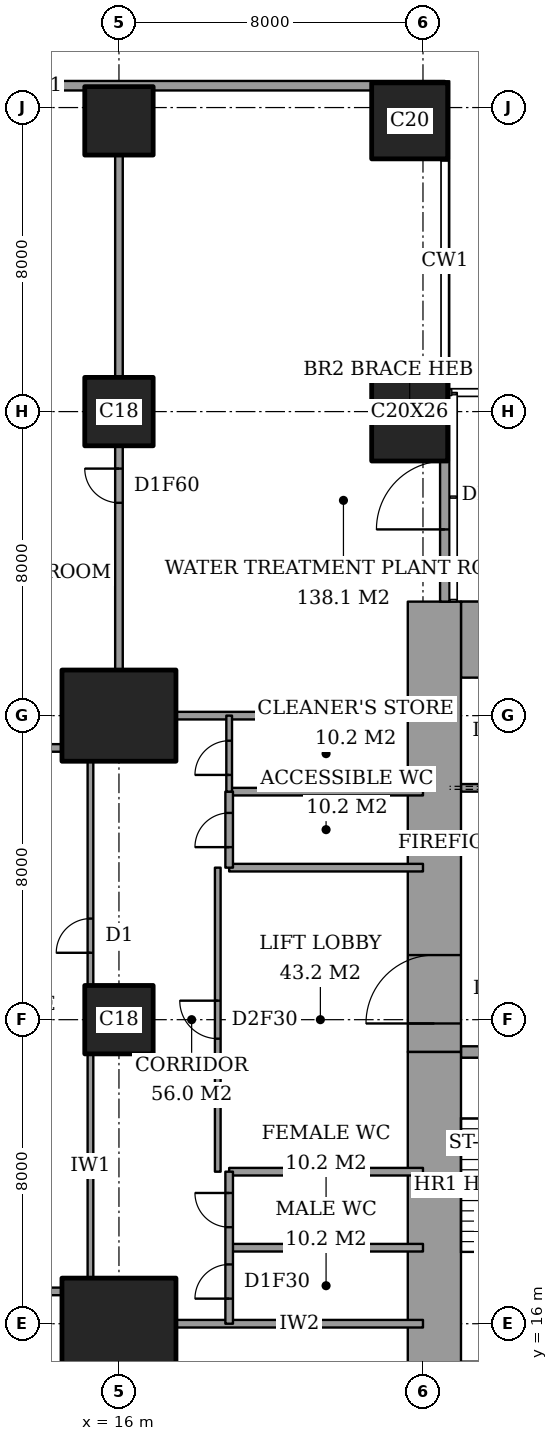
"""IFC4 building model, lengths in metres.
Left out: names, types, materials, properties, quantities, classifications, styles, units other than length and angle.
Written with IfcOpenShell. Run it as: python <this file> out.ifc"""

import sys

from ifc_helpers import new_model, si_unit, direction, frame, frame_2d, origin, origin_2d, place, context, subcontext, project, spatial, rectangle, extrude, element, fill, save


model = new_model("IFC4")
c1 = context("Model", 3, precision=1e-05, world=origin(), true_north=direction((0.0, 1.0)))
c2 = subcontext(c1, "Body", "Model", "MODEL_VIEW")
j1 = project(units=[si_unit("LENGTHUNIT", "METRE"), si_unit("PLANEANGLEUNIT", "RADIAN")], contexts=[c1])
p1 = place(None, origin())
s1 = spatial("IfcSite", under=j1, at=p1, CompositionType="ELEMENT")
p2 = place(p1, origin())
s2 = spatial("IfcBuilding", under=s1, at=p2, CompositionType="ELEMENT")
p3 = place(p2, frame((0.0, 0.0, 177.2)))
s3 = spatial("IfcBuildingStorey", under=s2, at=p3, CompositionType="ELEMENT", Elevation=177.2)
p4 = place(p3, frame((16.0, 16.0, 0.0), z_axis=(0.0, 0.0, 1.0), x_axis=(1.0, 0.0, 0.0)))
e1 = element("IfcColumn", 1, at=p4, inside=s3, PredefinedType="COLUMN", context=c2, shape_type="SweptSolid", body=[
    extrude(rectangle(XDim=3.0, YDim=2.4, at=origin_2d()), origin(), (0.0, 0.0, 1.0), 5.0),
])
p5 = place(p3, frame((16.0, 24.0, 0.0), z_axis=(0.0, 0.0, 1.0), x_axis=(1.0, 0.0, 0.0)))
e2 = element("IfcColumn", 2, at=p5, inside=s3, PredefinedType="COLUMN", context=c2, shape_type="SweptSolid", body=[
    extrude(rectangle(XDim=1.8, YDim=1.8, at=origin_2d()), origin(), (0.0, 0.0, 1.0), 5.0),
])
p6 = place(p3, frame((16.0, 32.0, 0.0), z_axis=(0.0, 0.0, 1.0), x_axis=(1.0, 0.0, 0.0)))
e3 = element("IfcColumn", 3, at=p6, inside=s3, PredefinedType="COLUMN", context=c2, shape_type="SweptSolid", body=[
    extrude(rectangle(XDim=3.0, YDim=2.4, at=origin_2d()), origin(), (0.0, 0.0, 1.0), 5.0),
])
for number, where, z_axis, x_axis in (
    (4, (16.0, 40.0, 0.0), (0.0, 0.0, 1.0), (1.0, 0.0, 0.0)),
    (5, (16.0, 47.65, 0.0), (0.0, 0.0, 1.0), (1.0, 0.0, 0.0)),
):
    element("IfcColumn", number, at=place(p3, frame(where, z_axis=z_axis, x_axis=x_axis)), inside=s3, PredefinedType="COLUMN", context=c2, shape_type="SweptSolid", body=[
        extrude(rectangle(XDim=1.8, YDim=1.8, at=origin_2d()), origin(), (0.0, 0.0, 1.0), 5.0),
    ])
p7 = place(p3, frame((23.65, 40.0, 0.0), z_axis=(0.0, 0.0, 1.0), x_axis=(1.0, 0.0, 0.0)))
e6 = element("IfcColumn", 6, at=p7, inside=s3, PredefinedType="COLUMN", context=c2, shape_type="SweptSolid", body=[
    extrude(rectangle(XDim=2.0, YDim=2.6, at=origin_2d()), origin(), (0.0, 0.0, 1.0), 5.0),
])
p8 = place(p3, frame((23.65, 47.65, 0.0), z_axis=(0.0, 0.0, 1.0), x_axis=(1.0, 0.0, 0.0)))
e7 = element("IfcColumn", 7, at=p8, inside=s3, PredefinedType="COLUMN", context=c2, shape_type="SweptSolid", body=[
    extrude(rectangle(XDim=2.0, YDim=2.0, at=origin_2d()), origin(), (0.0, 0.0, 1.0), 5.0),
])
p9 = place(p3, frame((25.0, 34.0, 0.0), z_axis=(0.0, 0.0, 1.0), x_axis=(1.0, 0.0, 0.0)))
e8 = element("IfcWall", 8, at=p9, inside=s3, PredefinedType="SHEAR", context=c2, shape_type="SweptSolid", body=[
    extrude(rectangle(XDim=3.15, YDim=2.0, at=frame_2d((1.575, 0.0))), origin(), (0.0, 0.0, 1.0), 5.0),
])
p10 = place(p3, frame((24.3, 13.0, 0.0), z_axis=(0.0, 0.0, 1.0), x_axis=(0.0, 1.0, 0.0)))
e9 = element("IfcWall", 9, at=p10, inside=s3, PredefinedType="SHEAR", context=c2, shape_type="SweptSolid", body=[
    extrude(rectangle(XDim=10.15, YDim=1.4, at=frame_2d((5.075, 0.0))), origin(), (0.0, 0.0, 1.0), 5.0),
])
p11 = place(p3, frame((24.3, 23.15, 0.0), z_axis=(0.0, 0.0, 1.0), x_axis=(0.0, 1.0, 0.0)))
e10 = element("IfcWall", 10, at=p11, inside=s3, PredefinedType="SHEAR", context=c2, shape_type="SweptSolid", body=[
    extrude(rectangle(XDim=11.85, YDim=1.4, at=frame_2d((5.925, 0.0))), origin(), (0.0, 0.0, 1.0), 5.0),
])
p12 = place(p11, frame((0.75, 0.0, 0.0)))
e11 = element("IfcOpeningElement", 11, at=p12, cuts=e10, PredefinedType="OPENING", context=c2, shape_type="SweptSolid", body=[
    extrude(rectangle(XDim=1.8, YDim=2.4, at=frame_2d((0.9, 1.2))), frame((0.0, 0.71, 0.0), z_axis=(0.0, -1.0, 0.0), x_axis=(1.0, 0.0, 0.0)), (0.0, 0.0, 1.0), 1.42),
])
p13 = place(p3, frame((25.0, 23.15, 0.0), z_axis=(0.0, 0.0, 1.0), x_axis=(1.0, 0.0, 0.0)))
e12 = element("IfcWall", 12, at=p13, inside=s3, PredefinedType="SHEAR", context=c2, shape_type="SweptSolid", body=[
    extrude(rectangle(XDim=3.15, YDim=0.3, at=frame_2d((1.575, 0.0))), origin(), (0.0, 0.0, 1.0), 5.0),
])
p14 = place(p13, frame((0.6, 0.0, 0.0)))
e13 = element("IfcOpeningElement", 13, at=p14, cuts=e12, PredefinedType="OPENING", context=c2, shape_type="SweptSolid", body=[
    extrude(rectangle(XDim=1.0, YDim=2.1, at=frame_2d((0.5, 1.05))), frame((0.0, 0.16, 0.0), z_axis=(0.0, -1.0, 0.0), x_axis=(1.0, 0.0, 0.0)), (0.0, 0.0, 1.0), 0.32),
])
p15 = place(p3, frame((24.575, 35.0, 0.0), z_axis=(0.0, 0.0, 1.0), x_axis=(0.0, 1.0, 0.0)))
e14 = element("IfcWall", 14, at=p15, inside=s3, PredefinedType="SOLIDWALL", context=c2, shape_type="SweptSolid", body=[
    extrude(rectangle(XDim=5.6, YDim=0.25, at=frame_2d((2.8, 0.0))), origin(), (0.0, 0.0, 1.0), 5.0),
])
p16 = place(p15, frame((1.9, 0.0, 0.0)))
e15 = element("IfcOpeningElement", 15, at=p16, cuts=e14, PredefinedType="OPENING", context=c2, shape_type="SweptSolid", body=[
    extrude(rectangle(XDim=1.8, YDim=2.4, at=frame_2d((0.9, 1.2))), frame((0.0, 0.135, 0.0), z_axis=(0.0, -1.0, 0.0), x_axis=(1.0, 0.0, 0.0)), (0.0, 0.0, 1.0), 0.27),
])
p17 = place(p3, frame((24.575, 48.575, 0.0), z_axis=(0.0, 0.0, 1.0), x_axis=(-1.0, 0.0, 0.0)))
e16 = element("IfcWall", 16, at=p17, inside=s3, PredefinedType="SOLIDWALL", context=c2, shape_type="SweptSolid", body=[
    extrude(rectangle(XDim=21.4, YDim=0.25, at=frame_2d((10.7, 0.0))), origin(), (0.0, 0.0, 1.0), 5.0),
])
p18 = place(p17, frame((18.175, 0.0, 0.6)))
e17 = element("IfcOpeningElement", 17, at=p18, cuts=e16, PredefinedType="OPENING", context=c2, shape_type="SweptSolid", body=[
    extrude(rectangle(XDim=2.4, YDim=3.0, at=frame_2d((1.2, 1.5))), frame((0.0, 0.135, 0.0), z_axis=(0.0, -1.0, 0.0), x_axis=(1.0, 0.0, 0.0)), (0.0, 0.0, 1.0), 0.27),
])
p19 = place(p3, frame((17.5, 16.0, 0.0), z_axis=(0.0, 0.0, 1.0), x_axis=(1.0, 0.0, 0.0)))
e18 = element("IfcWall", 18, at=p19, inside=s3, PredefinedType="PARTITIONING", context=c2, shape_type="SweptSolid", body=[
    extrude(rectangle(XDim=6.5, YDim=0.2, at=frame_2d((3.25, 0.0))), origin(), (0.0, 0.0, 1.0), 4.75),
])
p20 = place(p3, frame((9.5, 16.85, 0.0), z_axis=(0.0, 0.0, 1.0), x_axis=(1.0, 0.0, 0.0)))
e19 = element("IfcWall", 19, at=p20, inside=s3, PredefinedType="PARTITIONING", context=c2, shape_type="SweptSolid", body=[
    extrude(rectangle(XDim=5.0, YDim=0.2, at=frame_2d((2.5, 0.0))), origin(), (0.0, 0.0, 1.0), 4.75),
])
for number, where, z_axis, x_axis in (
    (20, (18.9, 18.0, 0.0), (0.0, 0.0, 1.0), (1.0, 0.0, 0.0)),
    (21, (18.9, 20.0, 0.0), (0.0, 0.0, 1.0), (1.0, 0.0, 0.0)),
    (22, (18.9, 28.0, 0.0), (0.0, 0.0, 1.0), (1.0, 0.0, 0.0)),
    (23, (18.9, 30.0, 0.0), (0.0, 0.0, 1.0), (1.0, 0.0, 0.0)),
):
    element("IfcWall", number, at=place(p3, frame(where, z_axis=z_axis, x_axis=x_axis)), inside=s3, PredefinedType="PARTITIONING", context=c2, shape_type="SweptSolid", body=[
        extrude(rectangle(XDim=5.1, YDim=0.2, at=frame_2d((2.55, 0.0))), origin(), (0.0, 0.0, 1.0), 4.75),
    ])
p21 = place(p3, frame((9.5, 31.15, 0.0), z_axis=(0.0, 0.0, 1.0), x_axis=(1.0, 0.0, 0.0)))
e24 = element("IfcWall", 24, at=p21, inside=s3, PredefinedType="PARTITIONING", context=c2, shape_type="SweptSolid", body=[
    extrude(rectangle(XDim=5.0, YDim=0.2, at=frame_2d((2.5, 0.0))), origin(), (0.0, 0.0, 1.0), 4.75),
])
p22 = place(p3, frame((17.5, 32.0, 0.0), z_axis=(0.0, 0.0, 1.0), x_axis=(1.0, 0.0, 0.0)))
e25 = element("IfcWall", 25, at=p22, inside=s3, PredefinedType="PARTITIONING", context=c2, shape_type="SweptSolid", body=[
    extrude(rectangle(XDim=6.5, YDim=0.2, at=frame_2d((3.25, 0.0))), origin(), (0.0, 0.0, 1.0), 4.75),
])
p23 = place(p3, frame((15.25, 17.2, 0.0), z_axis=(0.0, 0.0, 1.0), x_axis=(0.0, 1.0, 0.0)))
e26 = element("IfcWall", 26, at=p23, inside=s3, PredefinedType="PARTITIONING", context=c2, shape_type="SweptSolid", body=[
    extrude(rectangle(XDim=5.9, YDim=0.15, at=frame_2d((2.95, 0.0))), origin(), (0.0, 0.0, 1.0), 4.75),
])
p24 = place(p3, frame((15.25, 24.9, 0.0), z_axis=(0.0, 0.0, 1.0), x_axis=(0.0, 1.0, 0.0)))
e27 = element("IfcWall", 27, at=p24, inside=s3, PredefinedType="PARTITIONING", context=c2, shape_type="SweptSolid", body=[
    extrude(rectangle(XDim=5.9, YDim=0.15, at=frame_2d((2.95, 0.0))), origin(), (0.0, 0.0, 1.0), 4.75),
])
p25 = place(p24, frame((0.86, 0.0, 0.0)))
e28 = element("IfcOpeningElement", 28, at=p25, cuts=e27, PredefinedType="OPENING", context=c2, shape_type="SweptSolid", body=[
    extrude(rectangle(XDim=0.9, YDim=2.1, at=frame_2d((0.45, 1.05))), frame((0.0, 0.085, 0.0), z_axis=(0.0, -1.0, 0.0), x_axis=(1.0, 0.0, 0.0)), (0.0, 0.0, 1.0), 0.17),
])
p26 = place(p3, frame((16.0, 33.2, 0.0), z_axis=(0.0, 0.0, 1.0), x_axis=(0.0, 1.0, 0.0)))
e29 = element("IfcWall", 29, at=p26, inside=s3, PredefinedType="PARTITIONING", context=c2, shape_type="SweptSolid", body=[
    extrude(rectangle(XDim=5.9, YDim=0.2, at=frame_2d((2.95, 0.0))), origin(), (0.0, 0.0, 1.0), 4.75),
])
p27 = place(p26, frame((4.4, 0.0, 0.0)))
e30 = element("IfcOpeningElement", 30, at=p27, cuts=e29, PredefinedType="OPENING", context=c2, shape_type="SweptSolid", body=[
    extrude(rectangle(XDim=0.9, YDim=2.1, at=frame_2d((0.45, 1.05))), frame((0.0, 0.11, 0.0), z_axis=(0.0, -1.0, 0.0), x_axis=(1.0, 0.0, 0.0)), (0.0, 0.0, 1.0), 0.22),
])
p28 = place(p3, frame((16.0, 40.9, 0.0), z_axis=(0.0, 0.0, 1.0), x_axis=(0.0, 1.0, 0.0)))
e31 = element("IfcWall", 31, at=p28, inside=s3, PredefinedType="PARTITIONING", context=c2, shape_type="SweptSolid", body=[
    extrude(rectangle(XDim=5.85, YDim=0.2, at=frame_2d((2.925, 0.0))), origin(), (0.0, 0.0, 1.0), 4.75),
])
p29 = place(p3, frame((18.6, 20.0, 0.0), z_axis=(0.0, 0.0, 1.0), x_axis=(0.0, 1.0, 0.0)))
e32 = element("IfcWall", 32, at=p29, inside=s3, PredefinedType="PARTITIONING", context=c2, shape_type="SweptSolid", body=[
    extrude(rectangle(XDim=8.0, YDim=0.15, at=frame_2d((4.0, 0.0))), origin(), (0.0, 0.0, 1.0), 4.75),
])
p30 = place(p29, frame((3.5, 0.0, 0.0)))
e33 = element("IfcOpeningElement", 33, at=p30, cuts=e32, PredefinedType="OPENING", context=c2, shape_type="SweptSolid", body=[
    extrude(rectangle(XDim=1.0, YDim=2.1, at=frame_2d((0.5, 1.05))), frame((0.0, 0.085, 0.0), z_axis=(0.0, -1.0, 0.0), x_axis=(1.0, 0.0, 0.0)), (0.0, 0.0, 1.0), 0.17),
])
p31 = place(p3, frame((18.9, 16.0, 0.0), z_axis=(0.0, 0.0, 1.0), x_axis=(0.0, 1.0, 0.0)))
e34 = element("IfcWall", 34, at=p31, inside=s3, PredefinedType="PARTITIONING", context=c2, shape_type="SweptSolid", body=[
    extrude(rectangle(XDim=4.0, YDim=0.2, at=frame_2d((2.0, 0.0))), origin(), (0.0, 0.0, 1.0), 4.75),
])
p32 = place(p31, frame((0.66, 0.0, 0.0)))
e35 = element("IfcOpeningElement", 35, at=p32, cuts=e34, PredefinedType="OPENING", context=c2, shape_type="SweptSolid", body=[
    extrude(rectangle(XDim=0.9, YDim=2.1, at=frame_2d((0.45, 1.05))), frame((0.0, 0.11, 0.0), z_axis=(0.0, -1.0, 0.0), x_axis=(1.0, 0.0, 0.0)), (0.0, 0.0, 1.0), 0.22),
])
p33 = place(p31, frame((2.54, 0.0, 0.0)))
e36 = element("IfcOpeningElement", 36, at=p33, cuts=e34, PredefinedType="OPENING", context=c2, shape_type="SweptSolid", body=[
    extrude(rectangle(XDim=0.9, YDim=2.1, at=frame_2d((0.45, 1.05))), frame((0.0, 0.11, 0.0), z_axis=(0.0, -1.0, 0.0), x_axis=(1.0, 0.0, 0.0)), (0.0, 0.0, 1.0), 0.22),
])
p34 = place(p3, frame((18.9, 28.0, 0.0), z_axis=(0.0, 0.0, 1.0), x_axis=(0.0, 1.0, 0.0)))
e37 = element("IfcWall", 37, at=p34, inside=s3, PredefinedType="PARTITIONING", context=c2, shape_type="SweptSolid", body=[
    extrude(rectangle(XDim=2.0, YDim=0.2, at=frame_2d((1.0, 0.0))), origin(), (0.0, 0.0, 1.0), 4.75),
])
p35 = place(p34, frame((0.54, 0.0, 0.0)))
e38 = element("IfcOpeningElement", 38, at=p35, cuts=e37, PredefinedType="OPENING", context=c2, shape_type="SweptSolid", body=[
    extrude(rectangle(XDim=0.9, YDim=2.1, at=frame_2d((0.45, 1.05))), frame((0.0, 0.11, 0.0), z_axis=(0.0, -1.0, 0.0), x_axis=(1.0, 0.0, 0.0)), (0.0, 0.0, 1.0), 0.22),
])
p36 = place(p3, frame((18.9, 30.0, 0.0), z_axis=(0.0, 0.0, 1.0), x_axis=(0.0, 1.0, 0.0)))
e39 = element("IfcWall", 39, at=p36, inside=s3, PredefinedType="PARTITIONING", context=c2, shape_type="SweptSolid", body=[
    extrude(rectangle(XDim=2.0, YDim=0.15, at=frame_2d((1.0, 0.0))), origin(), (0.0, 0.0, 1.0), 4.75),
])
p37 = place(p36, frame((0.44, 0.0, 0.0)))
e40 = element("IfcOpeningElement", 40, at=p37, cuts=e39, PredefinedType="OPENING", context=c2, shape_type="SweptSolid", body=[
    extrude(rectangle(XDim=0.9, YDim=2.1, at=frame_2d((0.45, 1.05))), frame((0.0, 0.085, 0.0), z_axis=(0.0, -1.0, 0.0), x_axis=(1.0, 0.0, 0.0)), (0.0, 0.0, 1.0), 0.17),
])
p38 = place(p3, frame((25.0, 30.1, 0.0), z_axis=(0.0, 0.0, 1.0), x_axis=(1.0, 0.0, 0.0)))
e41 = element("IfcWall", 41, at=p38, inside=s3, PredefinedType="PARTITIONING", context=c2, shape_type="SweptSolid", body=[
    extrude(rectangle(XDim=12.7, YDim=0.2, at=frame_2d((6.35, 0.0))), origin(), (0.0, 0.0, 1.0), 5.0),
])
p39 = place(p38, frame((4.25, 0.0, 0.0)))
e42 = element("IfcOpeningElement", 42, at=p39, cuts=e41, PredefinedType="OPENING", context=c2, shape_type="SweptSolid", body=[
    extrude(rectangle(XDim=1.1, YDim=2.1, at=frame_2d((0.55, 1.05))), frame((0.0, 0.11, 0.0), z_axis=(0.0, -1.0, 0.0), x_axis=(1.0, 0.0, 0.0)), (0.0, 0.0, 1.0), 0.22),
])
p40 = place(p38, frame((7.45, 0.0, 0.0)))
e43 = element("IfcOpeningElement", 43, at=p40, cuts=e41, PredefinedType="OPENING", context=c2, shape_type="SweptSolid", body=[
    extrude(rectangle(XDim=1.1, YDim=2.1, at=frame_2d((0.55, 1.05))), frame((0.0, 0.11, 0.0), z_axis=(0.0, -1.0, 0.0), x_axis=(1.0, 0.0, 0.0)), (0.0, 0.0, 1.0), 0.22),
])
p41 = place(p38, frame((10.65, 0.0, 0.0)))
e44 = element("IfcOpeningElement", 44, at=p41, cuts=e41, PredefinedType="OPENING", context=c2, shape_type="SweptSolid", body=[
    extrude(rectangle(XDim=1.1, YDim=2.1, at=frame_2d((0.55, 1.05))), frame((0.0, 0.11, 0.0), z_axis=(0.0, -1.0, 0.0), x_axis=(1.0, 0.0, 0.0)), (0.0, 0.0, 1.0), 0.22),
])
p42 = place(p38, frame((0.9, 0.0, 0.0)))
e45 = element("IfcOpeningElement", 45, at=p42, cuts=e41, PredefinedType="OPENING", context=c2, shape_type="SweptSolid", body=[
    extrude(rectangle(XDim=1.2, YDim=2.1, at=frame_2d((0.6, 1.05))), frame((0.0, 0.11, 0.0), z_axis=(0.0, -1.0, 0.0), x_axis=(1.0, 0.0, 0.0)), (0.0, 0.0, 1.0), 0.22),
])
p43 = place(p16, origin())
e46 = element("IfcDoor", 46, at=p43, inside=s3, OperationType="DOUBLE_DOOR_DOUBLE_SWING", PredefinedType="DOOR", context=c2, shape_type="SweptSolid", body=[
    extrude(rectangle(XDim=1.8, YDim=2.4, at=frame_2d((0.9, 1.2))), frame((0.0, 0.025, 0.0), z_axis=(0.0, -1.0, 0.0), x_axis=(1.0, 0.0, 0.0)), (0.0, 0.0, 1.0), 0.05),
])
fill(e15, e46)
p44 = place(p25, origin())
e47 = element("IfcDoor", 47, at=p44, inside=s3, OperationType="SINGLE_SWING_RIGHT", PredefinedType="DOOR", context=c2, shape_type="SweptSolid", body=[
    extrude(rectangle(XDim=0.9, YDim=2.1, at=frame_2d((0.45, 1.05))), frame((0.0, 0.025, 0.0), z_axis=(0.0, -1.0, 0.0), x_axis=(1.0, 0.0, 0.0)), (0.0, 0.0, 1.0), 0.05),
])
fill(e28, e47)
p45 = place(p30, origin())
e48 = element("IfcDoor", 48, at=p45, inside=s3, OperationType="SINGLE_SWING_LEFT", PredefinedType="DOOR", context=c2, shape_type="SweptSolid", body=[
    extrude(rectangle(XDim=1.0, YDim=2.1, at=frame_2d((0.5, 1.05))), frame((0.0, 0.025, 0.0), z_axis=(0.0, -1.0, 0.0), x_axis=(1.0, 0.0, 0.0)), (0.0, 0.0, 1.0), 0.05),
])
fill(e33, e48)
p46 = place(p32, origin())
e49 = element("IfcDoor", 49, at=p46, inside=s3, OperationType="SINGLE_SWING_RIGHT", PredefinedType="DOOR", context=c2, shape_type="SweptSolid", body=[
    extrude(rectangle(XDim=0.9, YDim=2.1, at=frame_2d((0.45, 1.05))), frame((0.0, 0.025, 0.0), z_axis=(0.0, -1.0, 0.0), x_axis=(1.0, 0.0, 0.0)), (0.0, 0.0, 1.0), 0.05),
])
fill(e35, e49)
p47 = place(p33, origin())
e50 = element("IfcDoor", 50, at=p47, inside=s3, OperationType="SINGLE_SWING_LEFT", PredefinedType="DOOR", context=c2, shape_type="SweptSolid", body=[
    extrude(rectangle(XDim=0.9, YDim=2.1, at=frame_2d((0.45, 1.05))), frame((0.0, 0.025, 0.0), z_axis=(0.0, -1.0, 0.0), x_axis=(1.0, 0.0, 0.0)), (0.0, 0.0, 1.0), 0.05),
])
fill(e36, e50)
p48 = place(p35, origin())
e51 = element("IfcDoor", 51, at=p48, inside=s3, OperationType="SINGLE_SWING_RIGHT", PredefinedType="DOOR", context=c2, shape_type="SweptSolid", body=[
    extrude(rectangle(XDim=0.9, YDim=2.1, at=frame_2d((0.45, 1.05))), frame((0.0, 0.025, 0.0), z_axis=(0.0, -1.0, 0.0), x_axis=(1.0, 0.0, 0.0)), (0.0, 0.0, 1.0), 0.05),
])
fill(e38, e51)
p49 = place(p37, origin())
e52 = element("IfcDoor", 52, at=p49, inside=s3, OperationType="SINGLE_SWING_RIGHT", PredefinedType="DOOR", context=c2, shape_type="SweptSolid", body=[
    extrude(rectangle(XDim=0.9, YDim=2.1, at=frame_2d((0.45, 1.05))), frame((0.0, 0.025, 0.0), z_axis=(0.0, -1.0, 0.0), x_axis=(1.0, 0.0, 0.0)), (0.0, 0.0, 1.0), 0.05),
])
fill(e40, e52)
p50 = place(p27, origin())
e53 = element("IfcDoor", 53, at=p50, inside=s3, OperationType="SINGLE_SWING_LEFT", PredefinedType="DOOR", context=c2, shape_type="SweptSolid", body=[
    extrude(rectangle(XDim=0.9, YDim=2.1, at=frame_2d((0.45, 1.05))), frame((0.0, 0.025, 0.0), z_axis=(0.0, -1.0, 0.0), x_axis=(1.0, 0.0, 0.0)), (0.0, 0.0, 1.0), 0.05),
])
fill(e30, e53)
p51 = place(p12, origin())
e54 = element("IfcDoor", 54, at=p51, inside=s3, OperationType="DOUBLE_DOOR_DOUBLE_SWING", PredefinedType="DOOR", context=c2, shape_type="SweptSolid", body=[
    extrude(rectangle(XDim=1.8, YDim=2.4, at=frame_2d((0.9, 1.2))), frame((0.0, 0.025, 0.0), z_axis=(0.0, -1.0, 0.0), x_axis=(1.0, 0.0, 0.0)), (0.0, 0.0, 1.0), 0.05),
])
fill(e11, e54)
save(model, sys.argv[1])
